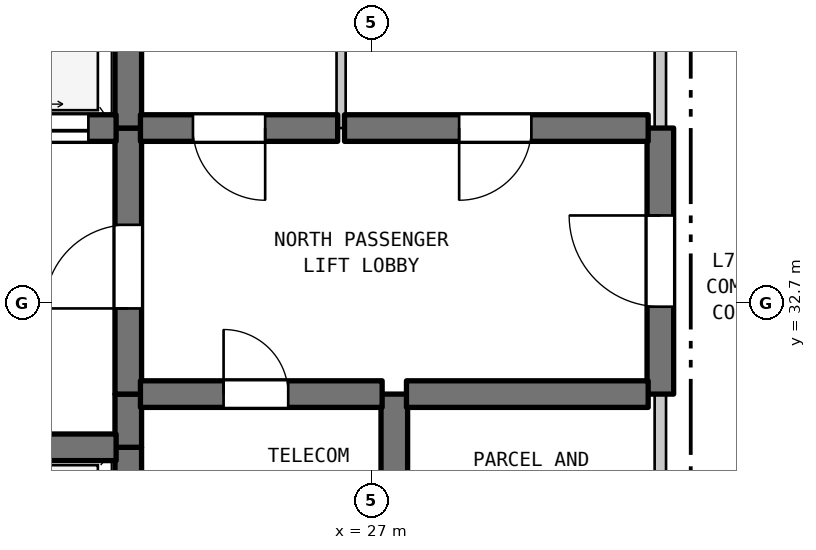
"""IFC4 building model, lengths in metres.
Left out: names, types, materials, properties, quantities, classifications, styles, units other than length and angle.
Written with IfcOpenShell. Run it as: python <this file> out.ifc"""

import sys

from ifc_helpers import new_model, si_unit, direction, frame, frame_2d, origin, place, context, subcontext, project, spatial, rectangle, extrude, element, fill, save


model = new_model("IFC4")
c1 = context("Model", 3, precision=1e-05, world=origin(), true_north=direction((0.0, 1.0)))
c2 = subcontext(c1, "Body", "Model", "MODEL_VIEW")
j1 = project(units=[si_unit("LENGTHUNIT", "METRE"), si_unit("PLANEANGLEUNIT", "RADIAN")], contexts=[c1])
p1 = place(None, origin())
s1 = spatial("IfcSite", under=j1, at=p1, CompositionType="ELEMENT")
p2 = place(p1, origin())
s2 = spatial("IfcBuilding", under=s1, at=p2, CompositionType="ELEMENT")
p3 = place(p2, frame((0.0, 0.0, 299.1)))
s3 = spatial("IfcBuildingStorey", under=s2, at=p3, CompositionType="ELEMENT", Elevation=299.1)
p4 = place(p3, frame((23.8, 28.2, 0.0), z_axis=(0.0, 0.0, 1.0), x_axis=(0.0, 1.0, 0.0)))
e1 = element("IfcWall", 1, at=p4, inside=s3, PredefinedType="SHEAR", context=c2, shape_type="SweptSolid", body=[
    extrude(rectangle(XDim=2.6, YDim=0.35, at=frame_2d((1.3, 0.0))), origin(), (0.0, 0.0, 1.0), 4.19),
])
p5 = place(p3, frame((23.8, 30.8, 0.0), z_axis=(0.0, 0.0, 1.0), x_axis=(0.0, 1.0, 0.0)))
e2 = element("IfcWall", 2, at=p5, inside=s3, PredefinedType="SHEAR", context=c2, shape_type="SweptSolid", body=[
    extrude(rectangle(XDim=0.7, YDim=0.35, at=frame_2d((0.35, 0.0))), origin(), (0.0, 0.0, 1.0), 4.19),
])
p6 = place(p3, frame((23.8, 31.5, 0.0), z_axis=(0.0, 0.0, 1.0), x_axis=(0.0, 1.0, 0.0)))
e3 = element("IfcWall", 3, at=p6, inside=s3, PredefinedType="SHEAR", context=c2, shape_type="SweptSolid", body=[
    extrude(rectangle(XDim=3.5, YDim=0.35, at=frame_2d((1.75, 0.0))), origin(), (0.0, 0.0, 1.0), 4.19),
])
p7 = place(p6, frame((1.127, 0.0, 0.0)))
e4 = element("IfcOpeningElement", 4, at=p7, cuts=e3, PredefinedType="OPENING", context=c2, shape_type="SweptSolid", body=[
    extrude(rectangle(XDim=1.1, YDim=2.15, at=frame_2d((0.55, 1.075))), frame((0.0, 0.185, 0.0), z_axis=(0.0, -1.0, 0.0), x_axis=(1.0, 0.0, 0.0)), (0.0, 0.0, 1.0), 0.37),
])
p8 = place(p3, frame((23.8, 35.0, 0.0), z_axis=(0.0, 0.0, 1.0), x_axis=(0.0, 1.0, 0.0)))
e5 = element("IfcWall", 5, at=p8, inside=s3, PredefinedType="SHEAR", context=c2, shape_type="SweptSolid", body=[
    extrude(rectangle(XDim=2.9, YDim=0.35, at=frame_2d((1.45, 0.0))), origin(), (0.0, 0.0, 1.0), 4.19),
])
p9 = place(p3, frame((26.6, 35.0, 0.0), z_axis=(0.0, 0.0, 1.0), x_axis=(0.0, 1.0, 0.0)))
e6 = element("IfcWall", 6, at=p9, inside=s3, PredefinedType="PARTITIONING", context=c2, shape_type="SweptSolid", body=[
    extrude(rectangle(XDim=2.9, YDim=0.12, at=frame_2d((1.45, 0.0))), origin(), (0.0, 0.0, 1.0), 4.19),
])
p10 = place(p3, frame((27.3, 28.9, 0.0), z_axis=(0.0, 0.0, 1.0), x_axis=(0.0, 1.0, 0.0)))
e7 = element("IfcWall", 7, at=p10, inside=s3, PredefinedType="SHEAR", context=c2, shape_type="SweptSolid", body=[
    extrude(rectangle(XDim=2.6, YDim=0.35, at=frame_2d((1.3, 0.0))), origin(), (0.0, 0.0, 1.0), 4.19),
])
p11 = place(p3, frame((30.8, 28.9, 0.0), z_axis=(0.0, 0.0, 1.0), x_axis=(0.0, 1.0, 0.0)))
e8 = element("IfcWall", 8, at=p11, inside=s3, PredefinedType="STANDARD", context=c2, shape_type="SweptSolid", body=[
    extrude(rectangle(XDim=2.6, YDim=0.15, at=frame_2d((1.3, 0.0))), origin(), (0.0, 0.0, 1.0), 4.19),
])
p12 = place(p3, frame((30.8, 31.5, 0.0), z_axis=(0.0, 0.0, 1.0), x_axis=(0.0, 1.0, 0.0)))
e9 = element("IfcWall", 9, at=p12, inside=s3, PredefinedType="SHEAR", context=c2, shape_type="SweptSolid", body=[
    extrude(rectangle(XDim=3.5, YDim=0.35, at=frame_2d((1.75, 0.0))), origin(), (0.0, 0.0, 1.0), 4.19),
])
p13 = place(p12, frame((1.15, 0.0, 0.0)))
e10 = element("IfcOpeningElement", 10, at=p13, cuts=e9, PredefinedType="OPENING", context=c2, shape_type="SweptSolid", body=[
    extrude(rectangle(XDim=1.2, YDim=2.2, at=frame_2d((0.6, 1.1))), frame((0.0, 0.185, 0.0), z_axis=(0.0, -1.0, 0.0), x_axis=(1.0, 0.0, 0.0)), (0.0, 0.0, 1.0), 0.37),
])
p14 = place(p3, frame((30.8, 35.0, 0.0), z_axis=(0.0, 0.0, 1.0), x_axis=(0.0, 1.0, 0.0)))
e11 = element("IfcWall", 11, at=p14, inside=s3, PredefinedType="STANDARD", context=c2, shape_type="SweptSolid", body=[
    extrude(rectangle(XDim=2.9, YDim=0.15, at=frame_2d((1.45, 0.0))), origin(), (0.0, 0.0, 1.0), 4.19),
])
p15 = place(p3, frame((19.16, 30.8, 0.0), z_axis=(0.0, 0.0, 1.0), x_axis=(1.0, 0.0, 0.0)))
e12 = element("IfcWall", 12, at=p15, inside=s3, PredefinedType="SHEAR", context=c2, shape_type="SweptSolid", body=[
    extrude(rectangle(XDim=4.48, YDim=0.35, at=frame_2d((2.24, 0.0))), origin(), (0.0, 0.0, 1.0), 4.19),
])
p16 = place(p3, frame((23.96, 31.5, 0.0), z_axis=(0.0, 0.0, 1.0), x_axis=(1.0, 0.0, 0.0)))
e13 = element("IfcWall", 13, at=p16, inside=s3, PredefinedType="SHEAR", context=c2, shape_type="SweptSolid", body=[
    extrude(rectangle(XDim=3.18, YDim=0.35, at=frame_2d((1.59, 0.0))), origin(), (0.0, 0.0, 1.0), 4.19),
])
p17 = place(p16, frame((1.094, 0.0, 0.0)))
e14 = element("IfcOpeningElement", 14, at=p17, cuts=e13, PredefinedType="OPENING", context=c2, shape_type="SweptSolid", body=[
    extrude(rectangle(XDim=0.85, YDim=2.1, at=frame_2d((0.425, 1.05))), frame((0.0, 0.185, 0.0), z_axis=(0.0, -1.0, 0.0), x_axis=(1.0, 0.0, 0.0)), (0.0, 0.0, 1.0), 0.37),
])
p18 = place(p3, frame((27.46, 31.5, 0.0), z_axis=(0.0, 0.0, 1.0), x_axis=(1.0, 0.0, 0.0)))
e15 = element("IfcWall", 15, at=p18, inside=s3, PredefinedType="SHEAR", context=c2, shape_type="SweptSolid", body=[
    extrude(rectangle(XDim=3.18, YDim=0.35, at=frame_2d((1.59, 0.0))), origin(), (0.0, 0.0, 1.0), 4.19),
])
p19 = place(p3, frame((19.16, 35.0, 0.0), z_axis=(0.0, 0.0, 1.0), x_axis=(1.0, 0.0, 0.0)))
e16 = element("IfcWall", 16, at=p19, inside=s3, PredefinedType="SHEAR", context=c2, shape_type="SweptSolid", body=[
    extrude(rectangle(XDim=4.48, YDim=0.35, at=frame_2d((2.24, 0.0))), origin(), (0.0, 0.0, 1.0), 4.19),
])
p20 = place(p19, frame((0.365, 0.0, 0.0)))
e17 = element("IfcOpeningElement", 17, at=p20, cuts=e16, PredefinedType="OPENING", context=c2, shape_type="SweptSolid", body=[
    extrude(rectangle(XDim=1.35, YDim=2.2, at=frame_2d((0.675, 1.1))), frame((0.0, 0.185, 0.0), z_axis=(0.0, -1.0, 0.0), x_axis=(1.0, 0.0, 0.0)), (0.0, 0.0, 1.0), 0.37),
])
p21 = place(p19, frame((2.765, 0.0, 0.0)))
e18 = element("IfcOpeningElement", 18, at=p21, cuts=e16, PredefinedType="OPENING", context=c2, shape_type="SweptSolid", body=[
    extrude(rectangle(XDim=1.35, YDim=2.2, at=frame_2d((0.675, 1.1))), frame((0.0, 0.185, 0.0), z_axis=(0.0, -1.0, 0.0), x_axis=(1.0, 0.0, 0.0)), (0.0, 0.0, 1.0), 0.37),
])
p22 = place(p3, frame((23.96, 35.0, 0.0), z_axis=(0.0, 0.0, 1.0), x_axis=(1.0, 0.0, 0.0)))
e19 = element("IfcWall", 19, at=p22, inside=s3, PredefinedType="SHEAR", context=c2, shape_type="SweptSolid", body=[
    extrude(rectangle(XDim=2.595, YDim=0.35, at=frame_2d((1.297, 0.0))), origin(), (0.0, 0.0, 1.0), 4.19),
])
p23 = place(p22, frame((0.691, 0.0, 0.0)))
e20 = element("IfcOpeningElement", 20, at=p23, cuts=e19, PredefinedType="OPENING", context=c2, shape_type="SweptSolid", body=[
    extrude(rectangle(XDim=0.95, YDim=2.15, at=frame_2d((0.475, 1.075))), frame((0.0, 0.185, 0.0), z_axis=(0.0, -1.0, 0.0), x_axis=(1.0, 0.0, 0.0)), (0.0, 0.0, 1.0), 0.37),
])
p24 = place(p3, frame((26.645, 35.0, 0.0), z_axis=(0.0, 0.0, 1.0), x_axis=(1.0, 0.0, 0.0)))
e21 = element("IfcWall", 21, at=p24, inside=s3, PredefinedType="SHEAR", context=c2, shape_type="SweptSolid", body=[
    extrude(rectangle(XDim=3.995, YDim=0.35, at=frame_2d((1.998, 0.0))), origin(), (0.0, 0.0, 1.0), 4.19),
])
p25 = place(p24, frame((1.508, 0.0, 0.0)))
e22 = element("IfcOpeningElement", 22, at=p25, cuts=e21, PredefinedType="OPENING", context=c2, shape_type="SweptSolid", body=[
    extrude(rectangle(XDim=0.95, YDim=2.15, at=frame_2d((0.475, 1.075))), frame((0.0, 0.185, 0.0), z_axis=(0.0, -1.0, 0.0), x_axis=(1.0, 0.0, 0.0)), (0.0, 0.0, 1.0), 0.37),
])
p26 = place(p7, origin())
e23 = element("IfcDoor", 23, at=p26, inside=s3, OperationType="SINGLE_SWING_LEFT", PredefinedType="DOOR", context=c2, shape_type="SweptSolid", body=[
    extrude(rectangle(XDim=1.1, YDim=2.15, at=frame_2d((0.55, 1.075))), frame((0.0, 0.025, 0.0), z_axis=(0.0, -1.0, 0.0), x_axis=(1.0, 0.0, 0.0)), (0.0, 0.0, 1.0), 0.05),
])
fill(e4, e23)
p27 = place(p13, origin())
e24 = element("IfcDoor", 24, at=p27, inside=s3, OperationType="SINGLE_SWING_RIGHT", PredefinedType="DOOR", context=c2, shape_type="SweptSolid", body=[
    extrude(rectangle(XDim=1.2, YDim=2.2, at=frame_2d((0.6, 1.1))), frame((0.0, 0.025, 0.0), z_axis=(0.0, -1.0, 0.0), x_axis=(1.0, 0.0, 0.0)), (0.0, 0.0, 1.0), 0.05),
])
fill(e10, e24)
p28 = place(p17, origin())
e25 = element("IfcDoor", 25, at=p28, inside=s3, OperationType="SINGLE_SWING_LEFT", PredefinedType="DOOR", context=c2, shape_type="SweptSolid", body=[
    extrude(rectangle(XDim=0.85, YDim=2.1, at=frame_2d((0.425, 1.05))), frame((0.0, 0.025, 0.0), z_axis=(0.0, -1.0, 0.0), x_axis=(1.0, 0.0, 0.0)), (0.0, 0.0, 1.0), 0.05),
])
fill(e14, e25)
p29 = place(p21, origin())
e26 = element("IfcDoor", 26, at=p29, inside=s3, OperationType="DOUBLE_DOOR_SLIDING", PredefinedType="DOOR", context=c2, shape_type="SweptSolid", body=[
    extrude(rectangle(XDim=1.35, YDim=2.2, at=frame_2d((0.675, 1.1))), frame((0.0, 0.025, 0.0), z_axis=(0.0, -1.0, 0.0), x_axis=(1.0, 0.0, 0.0)), (0.0, 0.0, 1.0), 0.05),
])
fill(e18, e26)
p30 = place(p23, frame((0.95, 0.0, 0.0), z_axis=(0.0, 0.0, 1.0), x_axis=(-1.0, 0.0, 0.0)))
e27 = element("IfcDoor", 27, at=p30, inside=s3, OperationType="SINGLE_SWING_RIGHT", PredefinedType="DOOR", context=c2, shape_type="SweptSolid", body=[
    extrude(rectangle(XDim=0.95, YDim=2.15, at=frame_2d((0.475, 1.075))), frame((0.0, 0.025, 0.0), z_axis=(0.0, -1.0, 0.0), x_axis=(1.0, 0.0, 0.0)), (0.0, 0.0, 1.0), 0.05),
])
fill(e20, e27)
p31 = place(p25, frame((0.95, 0.0, 0.0), z_axis=(0.0, 0.0, 1.0), x_axis=(-1.0, 0.0, 0.0)))
e28 = element("IfcDoor", 28, at=p31, inside=s3, OperationType="SINGLE_SWING_LEFT", PredefinedType="DOOR", context=c2, shape_type="SweptSolid", body=[
    extrude(rectangle(XDim=0.95, YDim=2.15, at=frame_2d((0.475, 1.075))), frame((0.0, 0.025, 0.0), z_axis=(0.0, -1.0, 0.0), x_axis=(1.0, 0.0, 0.0)), (0.0, 0.0, 1.0), 0.05),
])
fill(e22, e28)
save(model, sys.argv[1])
